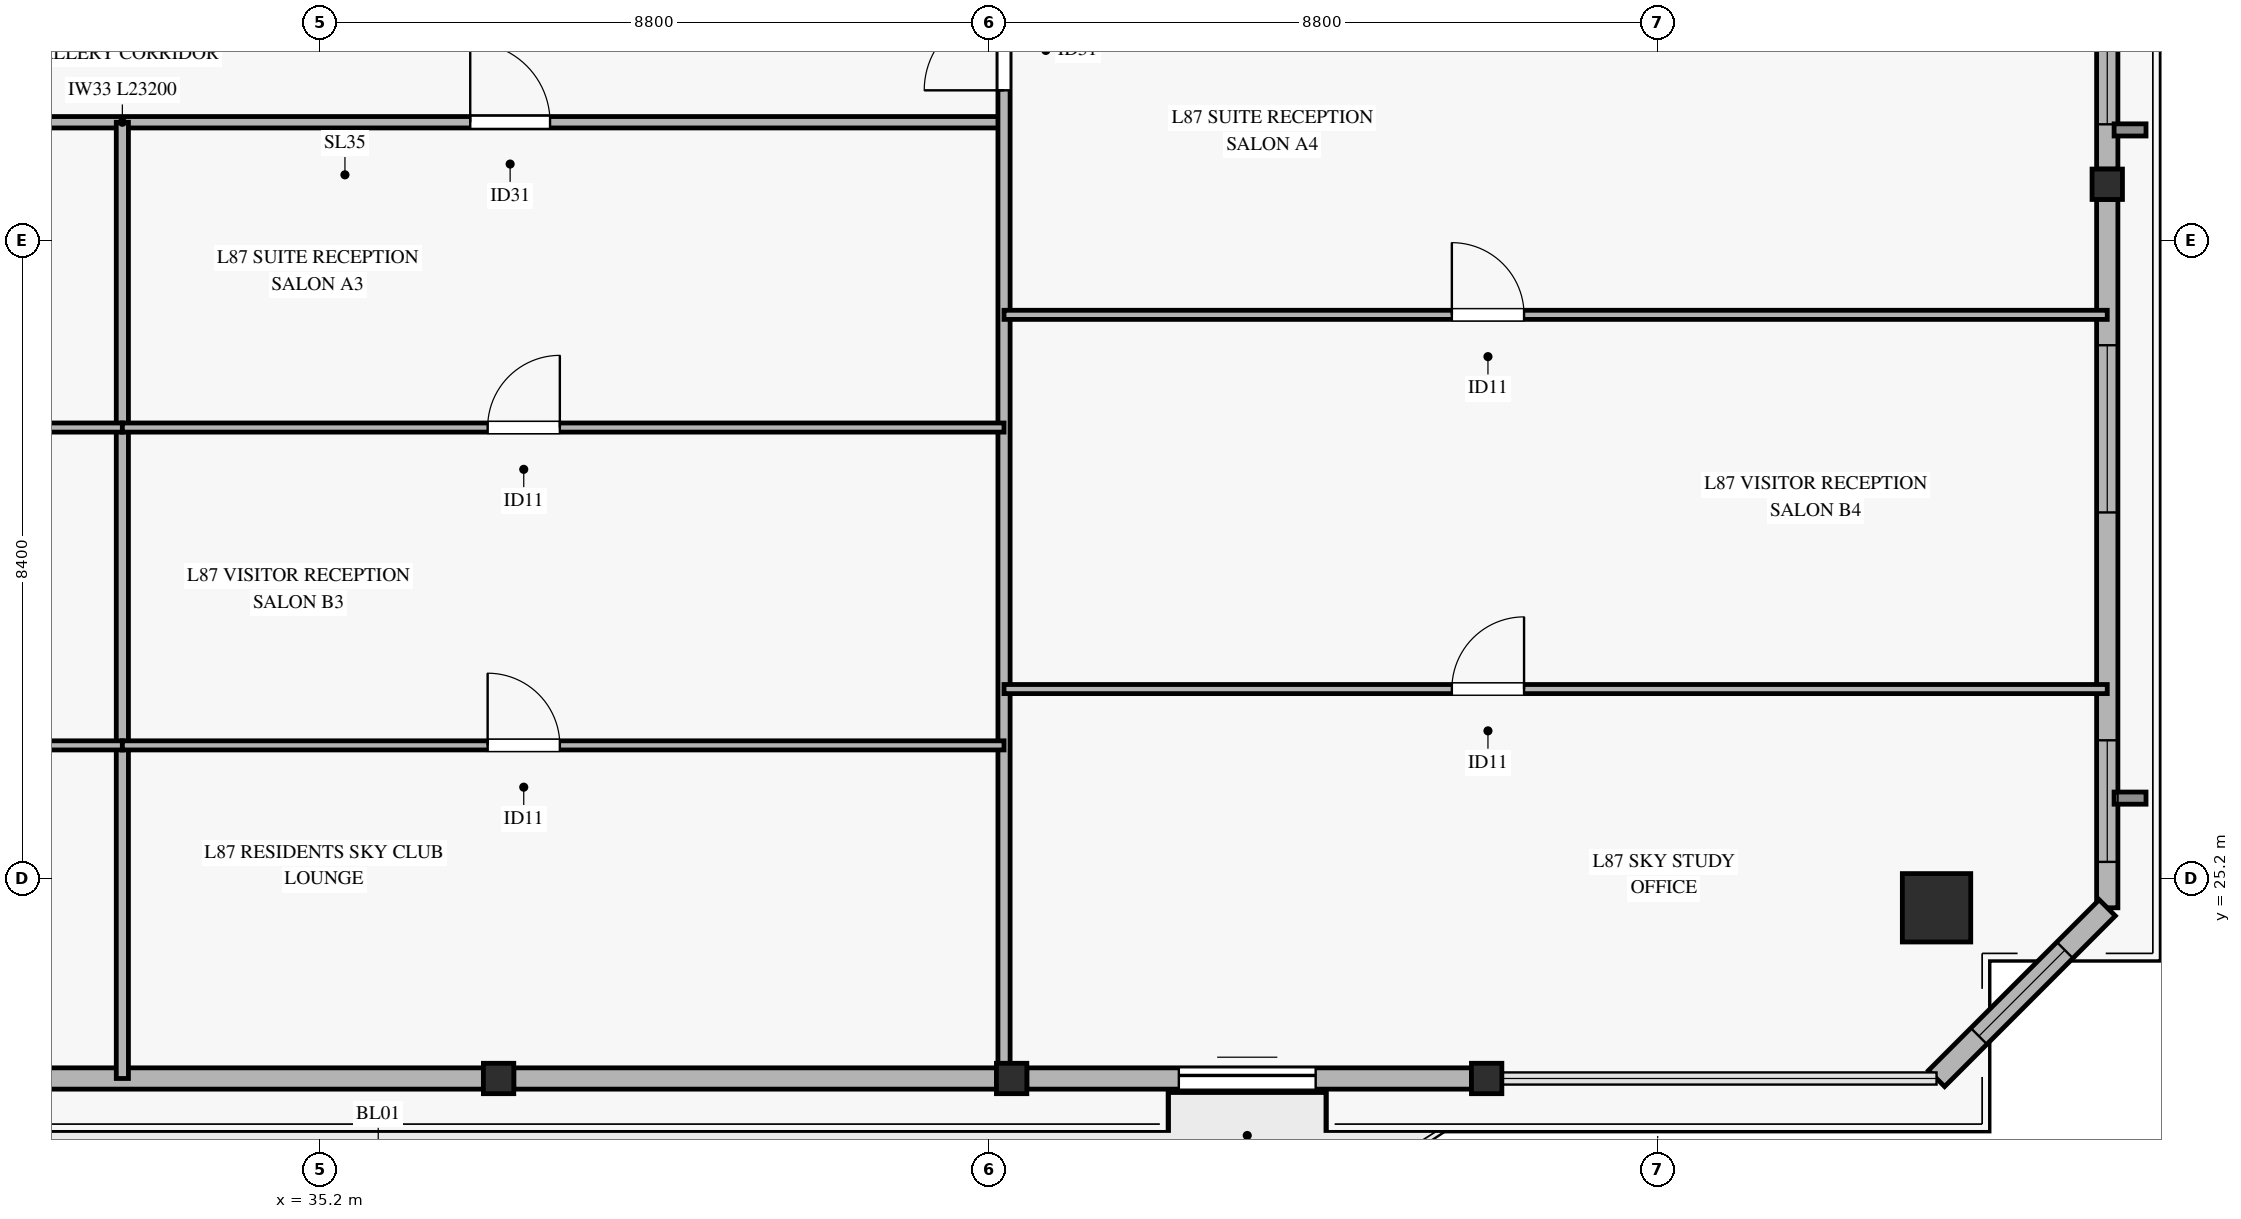
"""IFC4 building model, lengths in metres.
Left out: names, types, materials, properties, quantities, classifications, styles, units other than length and angle.
Written with IfcOpenShell. Run it as: python <this file> out.ifc"""

import sys

from ifc_helpers import new_model, si_unit, direction, frame, frame_2d, origin, origin_2d, place, context, subcontext, project, spatial, rectangle, hollow_rectangle, extrude, source, transform, mapped, element, fill, save


model = new_model("IFC4")
c1 = context("Model", 3, precision=1e-05, world=origin(), true_north=direction((0.0, 1.0)))
c2 = subcontext(c1, "Body", "Model", "MODEL_VIEW")
j1 = project(units=[si_unit("LENGTHUNIT", "METRE"), si_unit("PLANEANGLEUNIT", "RADIAN")], contexts=[c1])
p1 = place(None, origin())
s1 = spatial("IfcSite", under=j1, at=p1, CompositionType="ELEMENT")
p2 = place(p1, origin())
s2 = spatial("IfcBuilding", under=s1, at=p2, CompositionType="ELEMENT")
p3 = place(p2, frame((0.0, 0.0, 335.7)))
s3 = spatial("IfcBuildingStorey", under=s2, at=p3, CompositionType="ELEMENT", Elevation=335.7)
m1 = source(origin(), c2, "Body", "SweptSolid", [
    extrude(hollow_rectangle(XDim=0.9, YDim=0.9, WallThickness=0.04, at=origin_2d()), origin(), (0.0, 0.0, 1.0), 3.185),
])
p4 = place(p3, frame((56.469, 24.814, 0.0), z_axis=(0.0, 0.0, 1.0), x_axis=(1.0, 0.0, 0.0)))
e1 = element("IfcColumn", 1, at=p4, inside=s3, PredefinedType="COLUMN", context=c2, shape_type="MappedRepresentation", body=[
    mapped(m1, transform((0.0, 0.0, 0.0), x_axis=(1.0, 0.0, 0.0), y_axis=(0.0, 1.0, 0.0), z_axis=(0.0, 0.0, 1.0), scale=1.0)),
])
m2 = source(origin(), c2, "Body", "SweptSolid", [
    extrude(hollow_rectangle(XDim=0.4, YDim=0.4, WallThickness=0.02, at=origin_2d()), origin(), (0.0, 0.0, 1.0), 3.185),
])
for number, where, z_axis, x_axis in (
    (2, (37.55, 22.568, 0.0), (0.0, 0.0, 1.0), (1.0, 0.0, 0.0)),
    (3, (44.3, 22.568, 0.0), (0.0, 0.0, 1.0), (1.0, 0.0, 0.0)),
    (4, (50.55, 22.568, 0.0), (0.0, 0.0, 1.0), (1.0, 0.0, 0.0)),
    (5, (58.715, 34.334, 0.0), (0.0, 0.0, 1.0), (1.0, 0.0, 0.0)),
):
    element("IfcColumn", number, at=place(p3, frame(where, z_axis=z_axis, x_axis=x_axis)), inside=s3, PredefinedType="COLUMN", context=c2, shape_type="MappedRepresentation", body=[
        mapped(m2, transform((0.0, 0.0, 0.0), x_axis=(1.0, 0.0, 0.0), y_axis=(0.0, 1.0, 0.0), z_axis=(0.0, 0.0, 1.0), scale=1.0)),
    ])
for number, where, z_axis, x_axis in (
    (6, (31.0, 22.568, 0.0), (0.0, 0.0, 1.0), (1.0, 0.0, 0.0)),
    (7, (37.75, 22.568, 0.0), (0.0, 0.0, 1.0), (1.0, 0.0, 0.0)),
):
    element("IfcWall", number, at=place(p3, frame(where, z_axis=z_axis, x_axis=x_axis)), inside=s3, PredefinedType="SOLIDWALL", context=c2, shape_type="SweptSolid", body=[
        extrude(rectangle(XDim=6.35, YDim=0.28, at=frame_2d((3.175, 0.0))), origin(), (0.0, 0.0, 1.0), 2.815),
    ])
p5 = place(p3, frame((44.5, 22.568, 0.0), z_axis=(0.0, 0.0, 1.0), x_axis=(1.0, 0.0, 0.0)))
e8 = element("IfcWall", 8, at=p5, inside=s3, PredefinedType="SOLIDWALL", context=c2, shape_type="SweptSolid", body=[
    extrude(rectangle(XDim=5.85, YDim=0.28, at=frame_2d((2.925, 0.0))), origin(), (0.0, 0.0, 1.0), 2.815),
])
p6 = place(p5, frame((2.0, 0.0, 0.0)))
e9 = element("IfcOpeningElement", 9, at=p6, cuts=e8, PredefinedType="OPENING", context=c2, shape_type="SweptSolid", body=[
    extrude(rectangle(XDim=1.8, YDim=2.25, at=frame_2d((0.9, 1.125))), frame((0.0, 0.15, 0.0), z_axis=(0.0, -1.0, 0.0), x_axis=(1.0, 0.0, 0.0)), (0.0, 0.0, 1.0), 0.3),
])
p7 = place(p3, frame((58.715, 24.814, 0.0), z_axis=(0.0, 0.0, 1.0), x_axis=(0.0, 1.0, 0.0)))
e10 = element("IfcWall", 10, at=p7, inside=s3, PredefinedType="SOLIDWALL", context=c2, shape_type="SweptSolid", body=[
    extrude(rectangle(XDim=9.32, YDim=0.28, at=frame_2d((4.66, 0.0))), origin(), (0.0, 0.0, 1.0), 2.815),
])
p8 = place(p7, frame((0.604, 0.0, 0.45)))
e11 = element("IfcOpeningElement", 11, at=p8, cuts=e10, PredefinedType="OPENING", context=c2, shape_type="SweptSolid", body=[
    extrude(rectangle(XDim=1.6, YDim=2.0, at=frame_2d((0.8, 1.0))), frame((0.0, 0.15, 0.0), z_axis=(0.0, -1.0, 0.0), x_axis=(1.0, 0.0, 0.0)), (0.0, 0.0, 1.0), 0.3),
])
p9 = place(p7, frame((5.202, 0.0, 0.45)))
e12 = element("IfcOpeningElement", 12, at=p9, cuts=e10, PredefinedType="OPENING", context=c2, shape_type="SweptSolid", body=[
    extrude(rectangle(XDim=2.2, YDim=2.1, at=frame_2d((1.1, 1.05))), frame((0.0, 0.15, 0.0), z_axis=(0.0, -1.0, 0.0), x_axis=(1.0, 0.0, 0.0)), (0.0, 0.0, 1.0), 0.3),
])
p10 = place(p3, frame((58.715, 34.534, 0.0), z_axis=(0.0, 0.0, 1.0), x_axis=(0.0, 1.0, 0.0)))
e13 = element("IfcWall", 13, at=p10, inside=s3, PredefinedType="SOLIDWALL", context=c2, shape_type="SweptSolid", body=[
    extrude(rectangle(XDim=9.32, YDim=0.28, at=frame_2d((4.66, 0.0))), origin(), (0.0, 0.0, 1.0), 2.815),
])
p11 = place(p10, frame((0.589, 0.0, 0.45)))
e14 = element("IfcOpeningElement", 14, at=p11, cuts=e13, PredefinedType="OPENING", context=c2, shape_type="SweptSolid", body=[
    extrude(rectangle(XDim=1.6, YDim=2.0, at=frame_2d((0.8, 1.0))), frame((0.0, 0.15, 0.0), z_axis=(0.0, -1.0, 0.0), x_axis=(1.0, 0.0, 0.0)), (0.0, 0.0, 1.0), 0.3),
])
p12 = place(p3, frame((56.469, 22.568, 0.0), z_axis=(0.0, 0.0, 1.0), x_axis=(0.707145211947, 0.707068348337, 0.0)))
e15 = element("IfcWall", 15, at=p12, inside=s3, PredefinedType="SOLIDWALL", context=c2, shape_type="SweptSolid", body=[
    extrude(rectangle(XDim=3.176, YDim=0.3, at=frame_2d((1.588, 0.0))), origin(), (0.0, 0.0, 1.0), 2.815),
])
p13 = place(p12, frame((0.788, 0.0, 0.45)))
e16 = element("IfcOpeningElement", 16, at=p13, cuts=e15, PredefinedType="OPENING", context=c2, shape_type="SweptSolid", body=[
    extrude(rectangle(XDim=1.6, YDim=2.0, at=frame_2d((0.8, 1.0))), frame((0.0, 0.16, 0.0), z_axis=(0.0, -1.0, 0.0), x_axis=(1.0, 0.0, 0.0)), (0.0, 0.0, 1.0), 0.32),
])
p14 = place(p3, frame((21.0, 35.15, 0.0), z_axis=(0.0, 0.0, 1.0), x_axis=(1.0, 0.0, 0.0)))
e17 = element("IfcWall", 17, at=p14, inside=s3, PredefinedType="PARTITIONING", context=c2, shape_type="SweptSolid", body=[
    extrude(rectangle(XDim=23.2, YDim=0.15, at=frame_2d((11.6, 0.0))), origin(), (0.0, 0.0, 1.0), 2.47),
])
p15 = place(p14, frame((4.577, 0.0, 0.0)))
e18 = element("IfcOpeningElement", 18, at=p15, cuts=e17, PredefinedType="OPENING", context=c2, shape_type="SweptSolid", body=[
    extrude(rectangle(XDim=1.05, YDim=2.15, at=frame_2d((0.525, 1.075))), frame((0.0, 0.085, 0.0), z_axis=(0.0, -1.0, 0.0), x_axis=(1.0, 0.0, 0.0)), (0.0, 0.0, 1.0), 0.17),
])
p16 = place(p14, frame((16.177, 0.0, 0.0)))
e19 = element("IfcOpeningElement", 19, at=p16, cuts=e17, PredefinedType="OPENING", context=c2, shape_type="SweptSolid", body=[
    extrude(rectangle(XDim=1.05, YDim=2.15, at=frame_2d((0.525, 1.075))), frame((0.0, 0.085, 0.0), z_axis=(0.0, -1.0, 0.0), x_axis=(1.0, 0.0, 0.0)), (0.0, 0.0, 1.0), 0.17),
])
p17 = place(p3, frame((32.6, 22.568, 0.0), z_axis=(0.0, 0.0, 1.0), x_axis=(0.0, 1.0, 0.0)))
e20 = element("IfcWall", 20, at=p17, inside=s3, PredefinedType="PARTITIONING", context=c2, shape_type="SweptSolid", body=[
    extrude(rectangle(XDim=12.582, YDim=0.16, at=frame_2d((6.291, 0.0))), origin(), (0.0, 0.0, 1.0), 2.77),
])
p18 = place(p3, frame((44.2, 22.568, 0.0), z_axis=(0.0, 0.0, 1.0), x_axis=(0.0, 1.0, 0.0)))
e21 = element("IfcWall", 21, at=p18, inside=s3, PredefinedType="PARTITIONING", context=c2, shape_type="SweptSolid", body=[
    extrude(rectangle(XDim=14.882, YDim=0.16, at=frame_2d((7.441, 0.0))), origin(), (0.0, 0.0, 1.0), 2.47),
])
p19 = place(p18, frame((13.002, 0.0, 0.0)))
e22 = element("IfcOpeningElement", 22, at=p19, cuts=e21, PredefinedType="OPENING", context=c2, shape_type="SweptSolid", body=[
    extrude(rectangle(XDim=1.05, YDim=2.15, at=frame_2d((0.525, 1.075))), frame((0.0, 0.09, 0.0), z_axis=(0.0, -1.0, 0.0), x_axis=(1.0, 0.0, 0.0)), (0.0, 0.0, 1.0), 0.18),
])
p20 = place(p3, frame((21.0, 26.951, 0.0), z_axis=(0.0, 0.0, 1.0), x_axis=(1.0, 0.0, 0.0)))
e23 = element("IfcWall", 23, at=p20, inside=s3, PredefinedType="PARTITIONING", context=c2, shape_type="SweptSolid", body=[
    extrude(rectangle(XDim=11.6, YDim=0.12, at=frame_2d((5.8, 0.0))), origin(), (0.0, 0.0, 1.0), 2.47),
])
p21 = place(p20, frame((4.806, 0.0, 0.0)))
e24 = element("IfcOpeningElement", 24, at=p21, cuts=e23, PredefinedType="OPENING", context=c2, shape_type="SweptSolid", body=[
    extrude(rectangle(XDim=0.95, YDim=2.1, at=frame_2d((0.475, 1.05))), frame((0.0, 0.07, 0.0), z_axis=(0.0, -1.0, 0.0), x_axis=(1.0, 0.0, 0.0)), (0.0, 0.0, 1.0), 0.14),
])
p22 = place(p3, frame((21.0, 31.133, 0.0), z_axis=(0.0, 0.0, 1.0), x_axis=(1.0, 0.0, 0.0)))
e25 = element("IfcWall", 25, at=p22, inside=s3, PredefinedType="PARTITIONING", context=c2, shape_type="SweptSolid", body=[
    extrude(rectangle(XDim=11.6, YDim=0.12, at=frame_2d((5.8, 0.0))), origin(), (0.0, 0.0, 1.0), 2.47),
])
p23 = place(p22, frame((4.806, 0.0, 0.0)))
e26 = element("IfcOpeningElement", 26, at=p23, cuts=e25, PredefinedType="OPENING", context=c2, shape_type="SweptSolid", body=[
    extrude(rectangle(XDim=0.95, YDim=2.1, at=frame_2d((0.475, 1.05))), frame((0.0, 0.07, 0.0), z_axis=(0.0, -1.0, 0.0), x_axis=(1.0, 0.0, 0.0)), (0.0, 0.0, 1.0), 0.14),
])
p24 = place(p3, frame((32.6, 26.951, 0.0), z_axis=(0.0, 0.0, 1.0), x_axis=(1.0, 0.0, 0.0)))
e27 = element("IfcWall", 27, at=p24, inside=s3, PredefinedType="PARTITIONING", context=c2, shape_type="SweptSolid", body=[
    extrude(rectangle(XDim=11.6, YDim=0.12, at=frame_2d((5.8, 0.0))), origin(), (0.0, 0.0, 1.0), 2.47),
])
p25 = place(p24, frame((4.806, 0.0, 0.0)))
e28 = element("IfcOpeningElement", 28, at=p25, cuts=e27, PredefinedType="OPENING", context=c2, shape_type="SweptSolid", body=[
    extrude(rectangle(XDim=0.95, YDim=2.1, at=frame_2d((0.475, 1.05))), frame((0.0, 0.07, 0.0), z_axis=(0.0, -1.0, 0.0), x_axis=(1.0, 0.0, 0.0)), (0.0, 0.0, 1.0), 0.14),
])
p26 = place(p3, frame((32.6, 31.133, 0.0), z_axis=(0.0, 0.0, 1.0), x_axis=(1.0, 0.0, 0.0)))
e29 = element("IfcWall", 29, at=p26, inside=s3, PredefinedType="PARTITIONING", context=c2, shape_type="SweptSolid", body=[
    extrude(rectangle(XDim=11.6, YDim=0.12, at=frame_2d((5.8, 0.0))), origin(), (0.0, 0.0, 1.0), 2.47),
])
p27 = place(p26, frame((4.806, 0.0, 0.0)))
e30 = element("IfcOpeningElement", 30, at=p27, cuts=e29, PredefinedType="OPENING", context=c2, shape_type="SweptSolid", body=[
    extrude(rectangle(XDim=0.95, YDim=2.1, at=frame_2d((0.475, 1.05))), frame((0.0, 0.07, 0.0), z_axis=(0.0, -1.0, 0.0), x_axis=(1.0, 0.0, 0.0)), (0.0, 0.0, 1.0), 0.14),
])
p28 = place(p3, frame((44.2, 27.692, 0.0), z_axis=(0.0, 0.0, 1.0), x_axis=(1.0, 0.0, 0.0)))
e31 = element("IfcWall", 31, at=p28, inside=s3, PredefinedType="PARTITIONING", context=c2, shape_type="SweptSolid", body=[
    extrude(rectangle(XDim=14.515, YDim=0.12, at=frame_2d((7.258, 0.0))), origin(), (0.0, 0.0, 1.0), 2.47),
])
p29 = place(p28, frame((5.892, 0.0, 0.0)))
e32 = element("IfcOpeningElement", 32, at=p29, cuts=e31, PredefinedType="OPENING", context=c2, shape_type="SweptSolid", body=[
    extrude(rectangle(XDim=0.95, YDim=2.1, at=frame_2d((0.475, 1.05))), frame((0.0, 0.07, 0.0), z_axis=(0.0, -1.0, 0.0), x_axis=(1.0, 0.0, 0.0)), (0.0, 0.0, 1.0), 0.14),
])
p30 = place(p3, frame((44.2, 32.616, 0.0), z_axis=(0.0, 0.0, 1.0), x_axis=(1.0, 0.0, 0.0)))
e33 = element("IfcWall", 33, at=p30, inside=s3, PredefinedType="PARTITIONING", context=c2, shape_type="SweptSolid", body=[
    extrude(rectangle(XDim=14.515, YDim=0.12, at=frame_2d((7.258, 0.0))), origin(), (0.0, 0.0, 1.0), 2.47),
])
p31 = place(p30, frame((5.892, 0.0, 0.0)))
e34 = element("IfcOpeningElement", 34, at=p31, cuts=e33, PredefinedType="OPENING", context=c2, shape_type="SweptSolid", body=[
    extrude(rectangle(XDim=0.95, YDim=2.1, at=frame_2d((0.475, 1.05))), frame((0.0, 0.07, 0.0), z_axis=(0.0, -1.0, 0.0), x_axis=(1.0, 0.0, 0.0)), (0.0, 0.0, 1.0), 0.14),
])
m3 = source(origin(), c2, "Body", "SweptSolid", [
    extrude(rectangle(XDim=1.8, YDim=2.25, at=frame_2d((0.9, 1.125))), frame((0.0, 0.025, 0.0), z_axis=(0.0, -1.0, 0.0), x_axis=(1.0, 0.0, 0.0)), (0.0, 0.0, 1.0), 0.05),
])
p32 = place(p6, origin())
e35 = element("IfcDoor", 35, at=p32, inside=s3, OperationType="SLIDING_TO_LEFT", PredefinedType="DOOR", context=c2, shape_type="MappedRepresentation", body=[
    mapped(m3, transform((0.0, 0.0, 0.0), x_axis=(1.0, 0.0, 0.0), y_axis=(0.0, 1.0, 0.0), z_axis=(0.0, 0.0, 1.0), scale=1.0)),
])
fill(e9, e35)
m4 = source(origin(), c2, "Body", "SweptSolid", [
    extrude(rectangle(XDim=1.6, YDim=2.0, at=frame_2d((0.8, 1.0))), frame((0.0, 0.03, 0.0), z_axis=(0.0, -1.0, 0.0), x_axis=(1.0, 0.0, 0.0)), (0.0, 0.0, 1.0), 0.06),
])
p33 = place(p8, origin())
e36 = element("IfcWindow", 36, at=p33, inside=s3, PartitioningType="SINGLE_PANEL", PredefinedType="WINDOW", context=c2, shape_type="MappedRepresentation", body=[
    mapped(m4, transform((0.0, 0.0, 0.0), x_axis=(1.0, 0.0, 0.0), y_axis=(0.0, 1.0, 0.0), z_axis=(0.0, 0.0, 1.0), scale=1.0)),
])
fill(e11, e36)
m5 = source(origin(), c2, "Body", "SweptSolid", [
    extrude(rectangle(XDim=2.2, YDim=2.1, at=frame_2d((1.1, 1.05))), frame((0.0, 0.03, 0.0), z_axis=(0.0, -1.0, 0.0), x_axis=(1.0, 0.0, 0.0)), (0.0, 0.0, 1.0), 0.06),
])
p34 = place(p9, origin())
e37 = element("IfcWindow", 37, at=p34, inside=s3, PartitioningType="SINGLE_PANEL", PredefinedType="WINDOW", context=c2, shape_type="MappedRepresentation", body=[
    mapped(m5, transform((0.0, 0.0, 0.0), x_axis=(1.0, 0.0, 0.0), y_axis=(0.0, 1.0, 0.0), z_axis=(0.0, 0.0, 1.0), scale=1.0)),
])
fill(e12, e37)
p35 = place(p11, origin())
e38 = element("IfcWindow", 38, at=p35, inside=s3, PartitioningType="SINGLE_PANEL", PredefinedType="WINDOW", context=c2, shape_type="MappedRepresentation", body=[
    mapped(m4, transform((0.0, 0.0, 0.0), x_axis=(1.0, 0.0, 0.0), y_axis=(0.0, 1.0, 0.0), z_axis=(0.0, 0.0, 1.0), scale=1.0)),
])
fill(e14, e38)
p36 = place(p13, origin())
e39 = element("IfcWindow", 39, at=p36, inside=s3, PartitioningType="SINGLE_PANEL", PredefinedType="WINDOW", context=c2, shape_type="MappedRepresentation", body=[
    mapped(m4, transform((0.0, 0.0, 0.0), x_axis=(1.0, 0.0, 0.0), y_axis=(0.0, 1.0, 0.0), z_axis=(0.0, 0.0, 1.0), scale=1.0)),
])
fill(e16, e39)
m6 = source(origin(), c2, "Body", "SweptSolid", [
    extrude(rectangle(XDim=1.05, YDim=2.15, at=frame_2d((0.525, 1.075))), frame((0.0, 0.025, 0.0), z_axis=(0.0, -1.0, 0.0), x_axis=(1.0, 0.0, 0.0)), (0.0, 0.0, 1.0), 0.05),
])
p37 = place(p16, origin())
e40 = element("IfcDoor", 40, at=p37, inside=s3, OperationType="SINGLE_SWING_LEFT", PredefinedType="DOOR", context=c2, shape_type="MappedRepresentation", body=[
    mapped(m6, transform((0.0, 0.0, 0.0), x_axis=(1.0, 0.0, 0.0), y_axis=(0.0, 1.0, 0.0), z_axis=(0.0, 0.0, 1.0), scale=1.0)),
])
fill(e19, e40)
m7 = source(origin(), c2, "Body", "SweptSolid", [
    extrude(rectangle(XDim=0.95, YDim=2.1, at=frame_2d((0.475, 1.05))), frame((0.0, 0.025, 0.0), z_axis=(0.0, -1.0, 0.0), x_axis=(1.0, 0.0, 0.0)), (0.0, 0.0, 1.0), 0.05),
])
p38 = place(p27, origin())
e41 = element("IfcDoor", 41, at=p38, inside=s3, OperationType="SINGLE_SWING_RIGHT", PredefinedType="DOOR", context=c2, shape_type="MappedRepresentation", body=[
    mapped(m7, transform((0.0, 0.0, 0.0), x_axis=(1.0, 0.0, 0.0), y_axis=(0.0, 1.0, 0.0), z_axis=(0.0, 0.0, 1.0), scale=1.0)),
])
fill(e30, e41)
p39 = place(p25, origin())
e42 = element("IfcDoor", 42, at=p39, inside=s3, OperationType="SINGLE_SWING_LEFT", PredefinedType="DOOR", context=c2, shape_type="MappedRepresentation", body=[
    mapped(m7, transform((0.0, 0.0, 0.0), x_axis=(1.0, 0.0, 0.0), y_axis=(0.0, 1.0, 0.0), z_axis=(0.0, 0.0, 1.0), scale=1.0)),
])
fill(e28, e42)
p40 = place(p19, origin())
e43 = element("IfcDoor", 43, at=p40, inside=s3, OperationType="SINGLE_SWING_LEFT", PredefinedType="DOOR", context=c2, shape_type="MappedRepresentation", body=[
    mapped(m6, transform((0.0, 0.0, 0.0), x_axis=(1.0, 0.0, 0.0), y_axis=(0.0, 1.0, 0.0), z_axis=(0.0, 0.0, 1.0), scale=1.0)),
])
fill(e22, e43)
p41 = place(p31, origin())
e44 = element("IfcDoor", 44, at=p41, inside=s3, OperationType="SINGLE_SWING_LEFT", PredefinedType="DOOR", context=c2, shape_type="MappedRepresentation", body=[
    mapped(m7, transform((0.0, 0.0, 0.0), x_axis=(1.0, 0.0, 0.0), y_axis=(0.0, 1.0, 0.0), z_axis=(0.0, 0.0, 1.0), scale=1.0)),
])
fill(e34, e44)
p42 = place(p29, origin())
e45 = element("IfcDoor", 45, at=p42, inside=s3, OperationType="SINGLE_SWING_RIGHT", PredefinedType="DOOR", context=c2, shape_type="MappedRepresentation", body=[
    mapped(m7, transform((0.0, 0.0, 0.0), x_axis=(1.0, 0.0, 0.0), y_axis=(0.0, 1.0, 0.0), z_axis=(0.0, 0.0, 1.0), scale=1.0)),
])
fill(e32, e45)
save(model, sys.argv[1])
